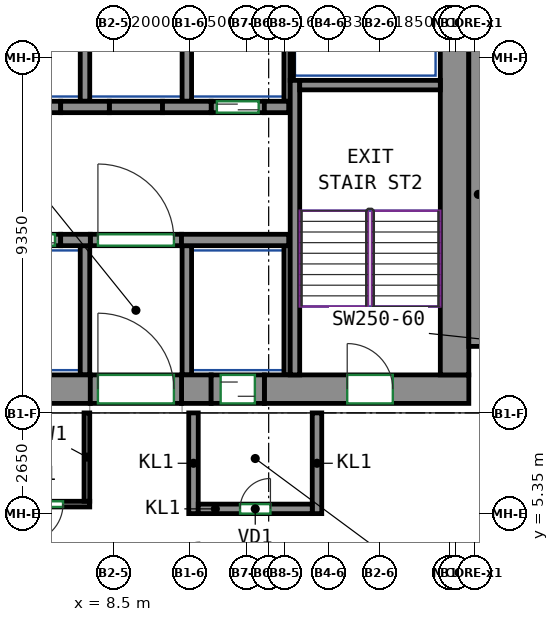
"""IFC4 building model, lengths in metres.
Left out: names, types, materials, properties, quantities, classifications, styles, units other than length and angle.
Written with IfcOpenShell. Run it as: python <this file> out.ifc"""

import sys

from ifc_helpers import new_model, si_unit, direction, frame, frame_2d, origin, place, context, subcontext, project, spatial, rectangle, extrude, source, transform, mapped, element, fill, save


model = new_model("IFC4")
c1 = context("Model", 3, precision=1e-05, world=origin(), true_north=direction((0.0, 1.0)))
c2 = subcontext(c1, "Body", "Model", "MODEL_VIEW")
j1 = project(units=[si_unit("LENGTHUNIT", "METRE"), si_unit("PLANEANGLEUNIT", "RADIAN")], contexts=[c1])
p1 = place(None, origin())
s1 = spatial("IfcSite", under=j1, at=p1, CompositionType="ELEMENT")
p2 = place(p1, origin())
s2 = spatial("IfcBuilding", under=s1, at=p2, CompositionType="ELEMENT")
p3 = place(p2, frame((0.0, 0.0, 213.5)))
s3 = spatial("IfcBuildingStorey", under=s2, at=p3, CompositionType="ELEMENT", Elevation=213.5)
m1 = source(origin(), c2, "Body", "SweptSolid", [
    extrude(rectangle(XDim=14.18, YDim=0.75, at=frame_2d((7.09, 0.0))), origin(), (0.0, 0.0, 1.0), 3.12),
])
p4 = place(p3, frame((-6.29, 8.625, 0.0), z_axis=(0.0, 0.0, 1.0), x_axis=(1.0, 0.0, 0.0)))
e1 = element("IfcWall", 1, at=p4, inside=s3, PredefinedType="SHEAR", context=c2, shape_type="MappedRepresentation", body=[
    mapped(m1, transform((0.0, 0.0, 0.0))),
])
m2 = source(origin(), c2, "Body", "SweptSolid", [
    extrude(rectangle(XDim=0.78, YDim=0.75, at=frame_2d((0.39, 0.0))), origin(), (0.0, 0.0, 1.0), 3.12),
])
p5 = place(p3, frame((10.29, 8.625, 0.0), z_axis=(0.0, 0.0, 1.0), x_axis=(1.0, 0.0, 0.0)))
e2 = element("IfcWall", 2, at=p5, inside=s3, PredefinedType="SHEAR", context=c2, shape_type="MappedRepresentation", body=[
    mapped(m2, transform((0.0, 0.0, 0.0))),
])
m3 = source(origin(), c2, "Body", "SweptSolid", [
    extrude(rectangle(XDim=5.38, YDim=0.75, at=frame_2d((2.69, 0.0))), origin(), (0.0, 0.0, 1.0), 3.12),
])
p6 = place(p3, frame((12.47, 8.625, 0.0), z_axis=(0.0, 0.0, 1.0), x_axis=(1.0, 0.0, 0.0)))
e3 = element("IfcWall", 3, at=p6, inside=s3, PredefinedType="SHEAR", context=c2, shape_type="MappedRepresentation", body=[
    mapped(m3, transform((0.0, 0.0, 0.0))),
])
p7 = place(p6, frame((2.18, 0.0, 0.0)))
e4 = element("IfcOpeningElement", 4, at=p7, cuts=e3, PredefinedType="OPENING", context=c2, shape_type="SweptSolid", body=[
    extrude(rectangle(XDim=1.2, YDim=2.1, at=frame_2d((0.6, 1.05))), frame((0.0, 0.385, 0.0), z_axis=(0.0, -1.0, 0.0), x_axis=(1.0, 0.0, 0.0)), (0.0, 0.0, 1.0), 0.77),
])
m4 = source(origin(), c2, "Body", "SweptSolid", [
    extrude(rectangle(XDim=12.0, YDim=0.75, at=frame_2d((6.0, 0.0))), origin(), (0.0, 0.0, 1.0), 3.12),
])
p8 = place(p3, frame((17.475, 9.0, 0.0), z_axis=(0.0, 0.0, 1.0), x_axis=(0.0, 1.0, 0.0)))
e5 = element("IfcWall", 5, at=p8, inside=s3, PredefinedType="SHEAR", context=c2, shape_type="MappedRepresentation", body=[
    mapped(m4, transform((0.0, 0.0, 0.0))),
])
m5 = source(origin(), c2, "Body", "SweptSolid", [
    extrude(rectangle(XDim=7.75, YDim=0.25, at=frame_2d((3.875, 0.0))), origin(), (0.0, 0.0, 1.0), 3.12),
])
p9 = place(p3, frame((13.275, 9.0, 0.0), z_axis=(0.0, 0.0, 1.0), x_axis=(0.0, 1.0, 0.0)))
e6 = element("IfcWall", 6, at=p9, inside=s3, PredefinedType="SHEAR", context=c2, shape_type="MappedRepresentation", body=[
    mapped(m5, transform((0.0, 0.0, 0.0))),
])
m6 = source(origin(), c2, "Body", "SweptSolid", [
    extrude(rectangle(XDim=3.7, YDim=0.25, at=frame_2d((1.85, 0.0))), origin(), (0.0, 0.0, 1.0), 3.12),
])
p10 = place(p3, frame((13.4, 16.625, 0.0), z_axis=(0.0, 0.0, 1.0), x_axis=(1.0, 0.0, 0.0)))
e7 = element("IfcWall", 7, at=p10, inside=s3, PredefinedType="SHEAR", context=c2, shape_type="MappedRepresentation", body=[
    mapped(m6, transform((0.0, 0.0, 0.0))),
])
m7 = source(origin(), c2, "Body", "SweptSolid", [
    extrude(rectangle(XDim=8.0, YDim=0.5, at=frame_2d((4.0, 0.0))), origin(), (0.0, 0.0, 1.0), 3.12),
])
p11 = place(p3, frame((18.1, 9.75, 0.0), z_axis=(0.0, 0.0, 1.0), x_axis=(0.0, 1.0, 0.0)))
e8 = element("IfcWall", 8, at=p11, inside=s3, PredefinedType="SHEAR", context=c2, shape_type="MappedRepresentation", body=[
    mapped(m7, transform((0.0, 0.0, 0.0))),
])
m8 = source(origin(), c2, "Body", "SweptSolid", [
    extrude(rectangle(XDim=0.78, YDim=0.3, at=frame_2d((0.39, 0.0))), origin(), (0.0, 0.0, 1.0), 3.12),
])
p12 = place(p3, frame((7.11, 12.55, 0.0), z_axis=(0.0, 0.0, 1.0), x_axis=(1.0, 0.0, 0.0)))
e9 = element("IfcWall", 9, at=p12, inside=s3, PredefinedType="SHEAR", context=c2, shape_type="MappedRepresentation", body=[
    mapped(m8, transform((0.0, 0.0, 0.0))),
])
m9 = source(origin(), c2, "Body", "SweptSolid", [
    extrude(rectangle(XDim=2.82, YDim=0.3, at=frame_2d((1.41, 0.0))), origin(), (0.0, 0.0, 1.0), 3.12),
])
p13 = place(p3, frame((10.29, 12.55, 0.0), z_axis=(0.0, 0.0, 1.0), x_axis=(1.0, 0.0, 0.0)))
e10 = element("IfcWall", 10, at=p13, inside=s3, PredefinedType="SHEAR", context=c2, shape_type="MappedRepresentation", body=[
    mapped(m9, transform((0.0, 0.0, 0.0))),
])
m10 = source(origin(), c2, "Body", "SweptSolid", [
    extrude(rectangle(XDim=1.28, YDim=0.3, at=frame_2d((0.64, 0.0))), origin(), (0.0, 0.0, 1.0), 3.12),
])
p14 = place(p3, frame((7.11, 16.05, 0.0), z_axis=(0.0, 0.0, 1.0), x_axis=(1.0, 0.0, 0.0)))
e11 = element("IfcWall", 11, at=p14, inside=s3, PredefinedType="SHEAR", context=c2, shape_type="MappedRepresentation", body=[
    mapped(m10, transform((0.0, 0.0, 0.0))),
])
m11 = source(origin(), c2, "Body", "SweptSolid", [
    extrude(rectangle(XDim=1.28, YDim=0.3, at=frame_2d((0.64, 0.0))), origin(), (0.0, 0.0, 1.0), 3.12),
])
p15 = place(p3, frame((9.79, 16.05, 0.0), z_axis=(0.0, 0.0, 1.0), x_axis=(1.0, 0.0, 0.0)))
e12 = element("IfcWall", 12, at=p15, inside=s3, PredefinedType="SHEAR", context=c2, shape_type="MappedRepresentation", body=[
    mapped(m11, transform((0.0, 0.0, 0.0))),
])
m12 = source(origin(), c2, "Body", "SweptSolid", [
    extrude(rectangle(XDim=0.64, YDim=0.3, at=frame_2d((0.32, 0.0))), origin(), (0.0, 0.0, 1.0), 3.12),
])
p16 = place(p3, frame((12.47, 16.05, 0.0), z_axis=(0.0, 0.0, 1.0), x_axis=(1.0, 0.0, 0.0)))
e13 = element("IfcWall", 13, at=p16, inside=s3, PredefinedType="SHEAR", context=c2, shape_type="MappedRepresentation", body=[
    mapped(m12, transform((0.0, 0.0, 0.0))),
])
m13 = source(origin(), c2, "Body", "SweptSolid", [
    extrude(rectangle(XDim=1.4, YDim=0.3, at=frame_2d((0.7, 0.0))), origin(), (0.0, 0.0, 1.0), 3.12),
])
p17 = place(p3, frame((5.71, 12.55, 0.0), z_axis=(0.0, 0.0, 1.0), x_axis=(1.0, 0.0, 0.0)))
e14 = element("IfcWall", 14, at=p17, inside=s3, PredefinedType="PARTITIONING", context=c2, shape_type="MappedRepresentation", body=[
    mapped(m13, transform((0.0, 0.0, 0.0))),
])
p18 = place(p17, frame((0.15, 0.0, 0.0)))
e15 = element("IfcOpeningElement", 15, at=p18, cuts=e14, PredefinedType="OPENING", context=c2, shape_type="SweptSolid", body=[
    extrude(rectangle(XDim=1.1, YDim=2.1, at=frame_2d((0.55, 1.05))), frame((0.0, 0.16, 0.0), z_axis=(0.0, -1.0, 0.0), x_axis=(1.0, 0.0, 0.0)), (0.0, 0.0, 1.0), 0.32),
])
m14 = source(origin(), c2, "Body", "SweptSolid", [
    extrude(rectangle(XDim=1.4, YDim=0.3, at=frame_2d((0.7, 0.0))), origin(), (0.0, 0.0, 1.0), 3.12),
])
p19 = place(p3, frame((11.07, 16.05, 0.0), z_axis=(0.0, 0.0, 1.0), x_axis=(1.0, 0.0, 0.0)))
e16 = element("IfcWall", 16, at=p19, inside=s3, PredefinedType="PARTITIONING", context=c2, shape_type="MappedRepresentation", body=[
    mapped(m14, transform((0.0, 0.0, 0.0))),
])
p20 = place(p19, frame((0.15, 0.0, 0.0)))
e17 = element("IfcOpeningElement", 17, at=p20, cuts=e16, PredefinedType="OPENING", context=c2, shape_type="SweptSolid", body=[
    extrude(rectangle(XDim=1.1, YDim=2.1, at=frame_2d((0.55, 1.05))), frame((0.0, 0.16, 0.0), z_axis=(0.0, -1.0, 0.0), x_axis=(1.0, 0.0, 0.0)), (0.0, 0.0, 1.0), 0.32),
])
m15 = source(origin(), c2, "Body", "SweptSolid", [
    extrude(rectangle(XDim=2.4, YDim=0.3, at=frame_2d((1.2, 0.0))), origin(), (0.0, 0.0, 1.0), 3.12),
])
p21 = place(p3, frame((7.89, 12.55, 0.0), z_axis=(0.0, 0.0, 1.0), x_axis=(1.0, 0.0, 0.0)))
e18 = element("IfcWall", 18, at=p21, inside=s3, PredefinedType="PARTITIONING", context=c2, shape_type="MappedRepresentation", body=[
    mapped(m15, transform((0.0, 0.0, 0.0))),
])
p22 = place(p21, frame((0.2, 0.0, 0.0)))
e19 = element("IfcOpeningElement", 19, at=p22, cuts=e18, PredefinedType="OPENING", context=c2, shape_type="SweptSolid", body=[
    extrude(rectangle(XDim=2.0, YDim=2.1, at=frame_2d((1.0, 1.05))), frame((0.0, 0.16, 0.0), z_axis=(0.0, -1.0, 0.0), x_axis=(1.0, 0.0, 0.0)), (0.0, 0.0, 1.0), 0.32),
])
for number, where, z_axis, x_axis in (
    (20, (5.71, 16.05, 0.0), (0.0, 0.0, 1.0), (1.0, 0.0, 0.0)),
    (21, (8.39, 16.05, 0.0), (0.0, 0.0, 1.0), (1.0, 0.0, 0.0)),
):
    element("IfcWall", number, at=place(p3, frame(where, z_axis=z_axis, x_axis=x_axis)), inside=s3, PredefinedType="PARTITIONING", context=c2, shape_type="MappedRepresentation", body=[
        mapped(m13, transform((0.0, 0.0, 0.0))),
    ])
m16 = source(origin(), c2, "Body", "SweptSolid", [
    extrude(rectangle(XDim=2.65, YDim=0.25, at=frame_2d((1.325, 0.0))), origin(), (0.0, 0.0, 1.0), 3.12),
])
for number, where, z_axis, x_axis in (
    (22, (10.605, 5.35, 0.0), (0.0, 0.0, 1.0), (0.0, 1.0, 0.0)),
    (23, (13.855, 5.35, 0.0), (0.0, 0.0, 1.0), (0.0, 1.0, 0.0)),
):
    element("IfcWall", number, at=place(p3, frame(where, z_axis=z_axis, x_axis=x_axis)), inside=s3, PredefinedType="PARTITIONING", context=c2, shape_type="MappedRepresentation", body=[
        mapped(m16, transform((0.0, 0.0, 0.0))),
    ])
m17 = source(origin(), c2, "Body", "SweptSolid", [
    extrude(rectangle(XDim=3.0, YDim=0.25, at=frame_2d((1.5, 0.0))), origin(), (0.0, 0.0, 1.0), 3.12),
])
p23 = place(p3, frame((10.73, 5.475, 0.0), z_axis=(0.0, 0.0, 1.0), x_axis=(1.0, 0.0, 0.0)))
e24 = element("IfcWall", 24, at=p23, inside=s3, PredefinedType="PARTITIONING", context=c2, shape_type="MappedRepresentation", body=[
    mapped(m17, transform((0.0, 0.0, 0.0))),
])
p24 = place(p23, frame((1.1, 0.0, 0.0)))
e25 = element("IfcOpeningElement", 25, at=p24, cuts=e24, PredefinedType="OPENING", context=c2, shape_type="SweptSolid", body=[
    extrude(rectangle(XDim=0.8, YDim=2.0, at=frame_2d((0.4, 1.0))), frame((0.0, 0.135, 0.0), z_axis=(0.0, -1.0, 0.0), x_axis=(1.0, 0.0, 0.0)), (0.0, 0.0, 1.0), 0.27),
])
m18 = source(origin(), c2, "Body", "SweptSolid", [
    extrude(rectangle(XDim=3.275, YDim=0.165, at=frame_2d((1.638, 0.0))), origin(), (0.0, 0.0, 1.0), 3.12),
])
p25 = place(p3, frame((13.067, 16.2, 0.0), z_axis=(0.0, 0.0, 1.0), x_axis=(0.0, 1.0, 0.0)))
e26 = element("IfcWall", 26, at=p25, inside=s3, PredefinedType="PARTITIONING", context=c2, shape_type="MappedRepresentation", body=[
    mapped(m18, transform((0.0, 0.0, 0.0))),
])
m19 = source(origin(), c2, "Body", "SweptSolid", [
    extrude(rectangle(XDim=3.275, YDim=0.25, at=frame_2d((1.638, 0.0))), origin(), (0.0, 0.0, 1.0), 3.12),
])
p26 = place(p3, frame((10.43, 16.2, 0.0), z_axis=(0.0, 0.0, 1.0), x_axis=(0.0, 1.0, 0.0)))
e27 = element("IfcWall", 27, at=p26, inside=s3, PredefinedType="PARTITIONING", context=c2, shape_type="MappedRepresentation", body=[
    mapped(m19, transform((0.0, 0.0, 0.0))),
])
m20 = source(origin(), c2, "Body", "SweptSolid", [
    extrude(rectangle(XDim=2.725, YDim=0.085, at=frame_2d((1.363, 0.0))), origin(), (0.0, 0.0, 1.0), 3.12),
])
p27 = place(p3, frame((13.192, 16.75, 0.0), z_axis=(0.0, 0.0, 1.0), x_axis=(0.0, 1.0, 0.0)))
e28 = element("IfcWall", 28, at=p27, inside=s3, PredefinedType="PARTITIONING", context=c2, shape_type="MappedRepresentation", body=[
    mapped(m20, transform((0.0, 0.0, 0.0))),
])
p28 = place(p3, frame((7.75, 16.2, 0.0), z_axis=(0.0, 0.0, 1.0), x_axis=(0.0, 1.0, 0.0)))
e29 = element("IfcWall", 29, at=p28, inside=s3, PredefinedType="PARTITIONING", context=c2, shape_type="MappedRepresentation", body=[
    mapped(m19, transform((0.0, 0.0, 0.0))),
])
m21 = source(origin(), c2, "Body", "SweptSolid", [
    extrude(rectangle(XDim=3.4, YDim=0.25, at=frame_2d((1.7, 0.0))), origin(), (0.0, 0.0, 1.0), 3.12),
])
p29 = place(p3, frame((10.43, 9.0, 0.0), z_axis=(0.0, 0.0, 1.0), x_axis=(0.0, 1.0, 0.0)))
e30 = element("IfcWall", 30, at=p29, inside=s3, PredefinedType="PARTITIONING", context=c2, shape_type="MappedRepresentation", body=[
    mapped(m21, transform((0.0, 0.0, 0.0))),
])
m22 = source(origin(), c2, "Body", "SweptSolid", [
    extrude(rectangle(XDim=3.4, YDim=0.165, at=frame_2d((1.7, 0.0))), origin(), (0.0, 0.0, 1.0), 3.12),
])
p30 = place(p3, frame((13.067, 9.0, 0.0), z_axis=(0.0, 0.0, 1.0), x_axis=(0.0, 1.0, 0.0)))
e31 = element("IfcWall", 31, at=p30, inside=s3, PredefinedType="PARTITIONING", context=c2, shape_type="MappedRepresentation", body=[
    mapped(m22, transform((0.0, 0.0, 0.0))),
])
p31 = place(p3, frame((7.75, 9.0, 0.0), z_axis=(0.0, 0.0, 1.0), x_axis=(0.0, 1.0, 0.0)))
e32 = element("IfcWall", 32, at=p31, inside=s3, PredefinedType="PARTITIONING", context=c2, shape_type="MappedRepresentation", body=[
    mapped(m21, transform((0.0, 0.0, 0.0))),
])
m23 = source(origin(), c2, "Body", "SweptSolid", [
    extrude(rectangle(XDim=2.4, YDim=0.75, at=frame_2d((1.2, 0.0))), origin(), (0.0, 0.0, 1.0), 2.7),
])
p32 = place(p3, frame((7.89, 8.625, 0.0), z_axis=(0.0, 0.0, 1.0), x_axis=(1.0, 0.0, 0.0)))
e33 = element("IfcWall", 33, at=p32, inside=s3, PredefinedType="PARTITIONING", context=c2, shape_type="MappedRepresentation", body=[
    mapped(m23, transform((0.0, 0.0, 0.0))),
])
p33 = place(p32, frame((0.2, 0.0, 0.0)))
e34 = element("IfcOpeningElement", 34, at=p33, cuts=e33, PredefinedType="OPENING", context=c2, shape_type="SweptSolid", body=[
    extrude(rectangle(XDim=2.0, YDim=2.1, at=frame_2d((1.0, 1.05))), frame((0.0, 0.385, 0.0), z_axis=(0.0, -1.0, 0.0), x_axis=(1.0, 0.0, 0.0)), (0.0, 0.0, 1.0), 0.77),
])
m24 = source(origin(), c2, "Body", "SweptSolid", [
    extrude(rectangle(XDim=1.4, YDim=0.75, at=frame_2d((0.7, 0.0))), origin(), (0.0, 0.0, 1.0), 2.7),
])
p34 = place(p3, frame((11.07, 8.625, 0.0), z_axis=(0.0, 0.0, 1.0), x_axis=(1.0, 0.0, 0.0)))
e35 = element("IfcWall", 35, at=p34, inside=s3, PredefinedType="PARTITIONING", context=c2, shape_type="MappedRepresentation", body=[
    mapped(m24, transform((0.0, 0.0, 0.0))),
])
p35 = place(p34, frame((0.25, 0.0, 0.0)))
e36 = element("IfcOpeningElement", 36, at=p35, cuts=e35, PredefinedType="OPENING", context=c2, shape_type="SweptSolid", body=[
    extrude(rectangle(XDim=0.9, YDim=2.1, at=frame_2d((0.45, 1.05))), frame((0.0, 0.385, 0.0), z_axis=(0.0, -1.0, 0.0), x_axis=(1.0, 0.0, 0.0)), (0.0, 0.0, 1.0), 0.77),
])
p36 = place(p3, frame((7.875, 5.6, 0.0), z_axis=(0.0, 0.0, 1.0), x_axis=(-1.0, 0.0, 0.0)))
e37 = element("IfcWall", 37, at=p36, inside=s3, PredefinedType="PARTITIONING", context=c2, shape_type="SweptSolid", body=[
    extrude(rectangle(XDim=13.275, YDim=0.15, at=frame_2d((6.637, 0.0))), origin(), (0.0, 0.0, 1.0), 3.12),
])
p37 = place(p36, frame((0.703, 0.0, 0.0)))
e38 = element("IfcOpeningElement", 38, at=p37, cuts=e37, PredefinedType="OPENING", context=c2, shape_type="SweptSolid", body=[
    extrude(rectangle(XDim=1.0, YDim=2.1, at=frame_2d((0.5, 1.05))), frame((0.0, 0.085, 0.0), z_axis=(0.0, -1.0, 0.0), x_axis=(1.0, 0.0, 0.0)), (0.0, 0.0, 1.0), 0.17),
])
p38 = place(p3, frame((7.8, 8.0, 0.0), z_axis=(0.0, 0.0, 1.0), x_axis=(0.0, -1.0, 0.0)))
e39 = element("IfcWall", 39, at=p38, inside=s3, PredefinedType="PARTITIONING", context=c2, shape_type="SweptSolid", body=[
    extrude(rectangle(XDim=2.325, YDim=0.15, at=frame_2d((1.163, 0.0))), origin(), (0.0, 0.0, 1.0), 3.12),
])
p39 = place(p22, origin())
e40 = element("IfcDoor", 40, at=p39, inside=s3, OperationType="DOUBLE_DOOR_SINGLE_SWING", PredefinedType="DOOR", context=c2, shape_type="SweptSolid", body=[
    extrude(rectangle(XDim=2.0, YDim=2.1, at=frame_2d((1.0, 1.05))), frame((0.0, 0.025, 0.0), z_axis=(0.0, -1.0, 0.0), x_axis=(1.0, 0.0, 0.0)), (0.0, 0.0, 1.0), 0.05),
])
fill(e19, e40)
p40 = place(p33, origin())
e41 = element("IfcDoor", 41, at=p40, inside=s3, OperationType="DOUBLE_DOOR_SINGLE_SWING", PredefinedType="DOOR", context=c2, shape_type="SweptSolid", body=[
    extrude(rectangle(XDim=2.0, YDim=2.1, at=frame_2d((1.0, 1.05))), frame((0.0, 0.28, 0.0), z_axis=(0.0, -1.0, 0.0), x_axis=(1.0, 0.0, 0.0)), (0.0, 0.0, 1.0), 0.05),
])
fill(e34, e41)
p41 = place(p24, origin())
e42 = element("IfcDoor", 42, at=p41, inside=s3, OperationType="SINGLE_SWING_RIGHT", PredefinedType="DOOR", context=c2, shape_type="SweptSolid", body=[
    extrude(rectangle(XDim=0.8, YDim=2.0, at=frame_2d((0.4, 1.0))), frame((0.0, 0.025, 0.0), z_axis=(0.0, -1.0, 0.0), x_axis=(1.0, 0.0, 0.0)), (0.0, 0.0, 1.0), 0.05),
])
fill(e25, e42)
p42 = place(p35, origin())
e43 = element("IfcDoor", 43, at=p42, inside=s3, OperationType="SLIDING_TO_LEFT", PredefinedType="DOOR", context=c2, shape_type="SweptSolid", body=[
    extrude(rectangle(XDim=0.9, YDim=2.1, at=frame_2d((0.45, 1.05))), frame((0.0, 0.28, 0.0), z_axis=(0.0, -1.0, 0.0), x_axis=(1.0, 0.0, 0.0)), (0.0, 0.0, 1.0), 0.05),
])
fill(e36, e43)
p43 = place(p18, origin())
e44 = element("IfcDoor", 44, at=p43, inside=s3, OperationType="DOUBLE_DOOR_SLIDING", PredefinedType="DOOR", context=c2, shape_type="SweptSolid", body=[
    extrude(rectangle(XDim=1.1, YDim=2.1, at=frame_2d((0.55, 1.05))), frame((0.0, 0.025, 0.0), z_axis=(0.0, -1.0, 0.0), x_axis=(1.0, 0.0, 0.0)), (0.0, 0.0, 1.0), 0.05),
])
fill(e15, e44)
p44 = place(p20, origin())
e45 = element("IfcDoor", 45, at=p44, inside=s3, OperationType="DOUBLE_DOOR_SLIDING", PredefinedType="DOOR", context=c2, shape_type="SweptSolid", body=[
    extrude(rectangle(XDim=1.1, YDim=2.1, at=frame_2d((0.55, 1.05))), frame((0.0, 0.025, 0.0), z_axis=(0.0, -1.0, 0.0), x_axis=(1.0, 0.0, 0.0)), (0.0, 0.0, 1.0), 0.05),
])
fill(e17, e45)
p45 = place(p7, origin())
e46 = element("IfcDoor", 46, at=p45, inside=s3, OperationType="DOUBLE_DOOR_SINGLE_SWING", PredefinedType="DOOR", context=c2, shape_type="SweptSolid", body=[
    extrude(rectangle(XDim=1.2, YDim=2.1, at=frame_2d((0.6, 1.05))), frame((0.0, 0.28, 0.0), z_axis=(0.0, -1.0, 0.0), x_axis=(1.0, 0.0, 0.0)), (0.0, 0.0, 1.0), 0.05),
])
fill(e4, e46)
p46 = place(p37, origin())
e47 = element("IfcDoor", 47, at=p46, inside=s3, OperationType="SINGLE_SWING_RIGHT", PredefinedType="DOOR", context=c2, shape_type="SweptSolid", body=[
    extrude(rectangle(XDim=1.0, YDim=2.1, at=frame_2d((0.5, 1.05))), frame((0.0, 0.025, 0.0), z_axis=(0.0, -1.0, 0.0), x_axis=(1.0, 0.0, 0.0)), (0.0, 0.0, 1.0), 0.05),
])
fill(e38, e47)
save(model, sys.argv[1])
